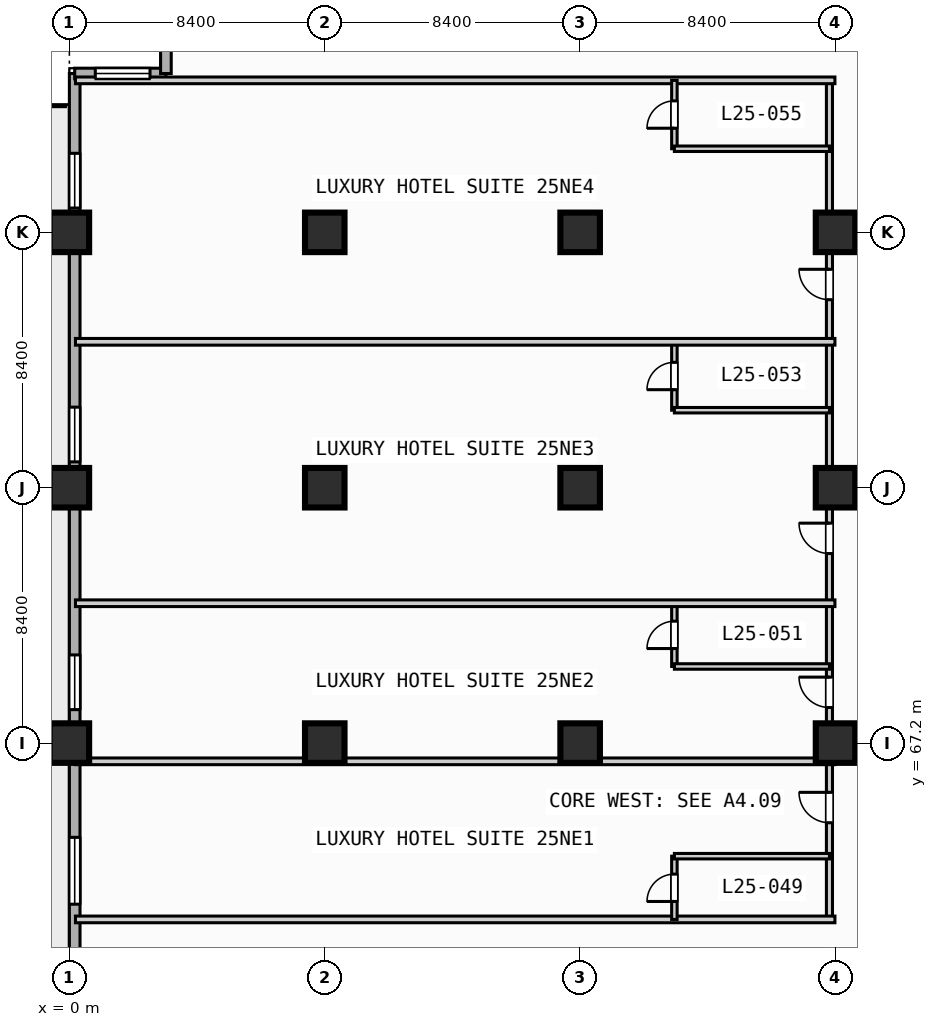
"""IFC4 building model, lengths in metres.
Left out: names, types, materials, properties, quantities, classifications, styles, units other than length and angle.
Written with IfcOpenShell. Run it as: python <this file> out.ifc"""

import sys

from ifc_helpers import new_model, si_unit, direction, frame, frame_2d, origin, origin_2d, place, context, subcontext, project, spatial, rectangle, extrude, element, fill, save


model = new_model("IFC4")
c1 = context("Model", 3, precision=1e-05, world=origin(), true_north=direction((0.0, 1.0)))
c2 = subcontext(c1, "Body", "Model", "MODEL_VIEW")
j1 = project(units=[si_unit("LENGTHUNIT", "METRE"), si_unit("PLANEANGLEUNIT", "RADIAN")], contexts=[c1])
p1 = place(None, origin())
s1 = spatial("IfcSite", under=j1, at=p1, CompositionType="ELEMENT")
p2 = place(p1, origin())
s2 = spatial("IfcBuilding", under=s1, at=p2, CompositionType="ELEMENT")
p3 = place(p2, frame((0.0, 0.0, 107.6)))
s3 = spatial("IfcBuildingStorey", under=s2, at=p3, CompositionType="ELEMENT", Elevation=107.6)
for number, where, z_axis, x_axis in (
    (1, (0.0, 67.2, 0.0), (0.0, 0.0, 1.0), (1.0, 0.0, 0.0)),
    (2, (0.0, 75.6, 0.0), (0.0, 0.0, 1.0), (1.0, 0.0, 0.0)),
    (3, (0.0, 84.0, 0.0), (0.0, 0.0, 1.0), (1.0, 0.0, 0.0)),
    (4, (8.4, 67.2, 0.0), (0.0, 0.0, 1.0), (1.0, 0.0, 0.0)),
    (5, (8.4, 75.6, 0.0), (0.0, 0.0, 1.0), (1.0, 0.0, 0.0)),
    (6, (8.4, 84.0, 0.0), (0.0, 0.0, 1.0), (1.0, 0.0, 0.0)),
    (7, (16.8, 67.2, 0.0), (0.0, 0.0, 1.0), (1.0, 0.0, 0.0)),
    (8, (16.8, 75.6, 0.0), (0.0, 0.0, 1.0), (1.0, 0.0, 0.0)),
    (9, (16.8, 84.0, 0.0), (0.0, 0.0, 1.0), (1.0, 0.0, 0.0)),
    (10, (25.2, 67.2, 0.0), (0.0, 0.0, 1.0), (1.0, 0.0, 0.0)),
    (11, (25.2, 75.6, 0.0), (0.0, 0.0, 1.0), (1.0, 0.0, 0.0)),
    (12, (25.2, 84.0, 0.0), (0.0, 0.0, 1.0), (1.0, 0.0, 0.0)),
):
    element("IfcColumn", number, at=place(p3, frame(where, z_axis=z_axis, x_axis=x_axis)), inside=s3, PredefinedType="COLUMN", context=c2, shape_type="SweptSolid", body=[
        extrude(rectangle(XDim=1.3, YDim=1.3, at=origin_2d()), origin(), (0.0, 0.0, 1.0), 3.8),
    ])
p4 = place(p3, frame((0.175, 3.175, 0.0), z_axis=(0.0, 0.0, 1.0), x_axis=(0.0, 1.0, 0.0)))
e13 = element("IfcWall", 13, at=p4, inside=s3, PredefinedType="STANDARD", context=c2, shape_type="SweptSolid", body=[
    extrude(rectangle(XDim=86.05, YDim=0.35, at=frame_2d((43.025, 0.0))), origin(), (0.0, 0.0, 1.0), 3.55),
])
p5 = place(p4, frame((42.325, 0.0, 0.0)))
e14 = element("IfcOpeningElement", 14, at=p5, cuts=e13, PredefinedType="OPENING", context=c2, shape_type="SweptSolid", body=[
    extrude(rectangle(XDim=1.4, YDim=2.2, at=frame_2d((0.7, 1.1))), frame((0.0, 0.185, 0.0), z_axis=(0.0, -1.0, 0.0), x_axis=(1.0, 0.0, 0.0)), (0.0, 0.0, 1.0), 0.37),
])
p6 = place(p4, frame((25.125, 0.0, 0.85)))
e15 = element("IfcOpeningElement", 15, at=p6, cuts=e13, PredefinedType="OPENING", context=c2, shape_type="SweptSolid", body=[
    extrude(rectangle(XDim=2.2, YDim=1.8, at=frame_2d((1.1, 0.9))), frame((0.0, 0.185, 0.0), z_axis=(0.0, -1.0, 0.0), x_axis=(1.0, 0.0, 0.0)), (0.0, 0.0, 1.0), 0.37),
])
p7 = place(p4, frame((33.525, 0.0, 0.85)))
e16 = element("IfcOpeningElement", 16, at=p7, cuts=e13, PredefinedType="OPENING", context=c2, shape_type="SweptSolid", body=[
    extrude(rectangle(XDim=2.2, YDim=1.8, at=frame_2d((1.1, 0.9))), frame((0.0, 0.185, 0.0), z_axis=(0.0, -1.0, 0.0), x_axis=(1.0, 0.0, 0.0)), (0.0, 0.0, 1.0), 0.37),
])
p8 = place(p4, frame((58.725, 0.0, 0.85)))
e17 = element("IfcOpeningElement", 17, at=p8, cuts=e13, PredefinedType="OPENING", context=c2, shape_type="SweptSolid", body=[
    extrude(rectangle(XDim=2.2, YDim=1.8, at=frame_2d((1.1, 0.9))), frame((0.0, 0.185, 0.0), z_axis=(0.0, -1.0, 0.0), x_axis=(1.0, 0.0, 0.0)), (0.0, 0.0, 1.0), 0.37),
])
p9 = place(p4, frame((65.125, 0.0, 0.85)))
e18 = element("IfcOpeningElement", 18, at=p9, cuts=e13, PredefinedType="OPENING", context=c2, shape_type="SweptSolid", body=[
    extrude(rectangle(XDim=1.8, YDim=1.8, at=frame_2d((0.9, 0.9))), frame((0.0, 0.185, 0.0), z_axis=(0.0, -1.0, 0.0), x_axis=(1.0, 0.0, 0.0)), (0.0, 0.0, 1.0), 0.37),
])
p10 = place(p4, frame((73.275, 0.0, 0.85)))
e19 = element("IfcOpeningElement", 19, at=p10, cuts=e13, PredefinedType="OPENING", context=c2, shape_type="SweptSolid", body=[
    extrude(rectangle(XDim=1.8, YDim=1.8, at=frame_2d((0.9, 0.9))), frame((0.0, 0.185, 0.0), z_axis=(0.0, -1.0, 0.0), x_axis=(1.0, 0.0, 0.0)), (0.0, 0.0, 1.0), 0.37),
])
p11 = place(p4, frame((81.625, 0.0, 0.85)))
e20 = element("IfcOpeningElement", 20, at=p11, cuts=e13, PredefinedType="OPENING", context=c2, shape_type="SweptSolid", body=[
    extrude(rectangle(XDim=1.8, YDim=1.8, at=frame_2d((0.9, 0.9))), frame((0.0, 0.185, 0.0), z_axis=(0.0, -1.0, 0.0), x_axis=(1.0, 0.0, 0.0)), (0.0, 0.0, 1.0), 0.37),
])
p12 = place(p3, frame((0.175, 89.225, 0.0), z_axis=(0.0, 0.0, 1.0), x_axis=(1.0, 0.0, 0.0)))
e21 = element("IfcWall", 21, at=p12, inside=s3, PredefinedType="STANDARD", context=c2, shape_type="SweptSolid", body=[
    extrude(rectangle(XDim=3.0, YDim=0.35, at=frame_2d((1.5, 0.0))), origin(), (0.0, 0.0, 1.0), 3.55),
])
p13 = place(p12, frame((0.677, 0.0, 0.85)))
e22 = element("IfcOpeningElement", 22, at=p13, cuts=e21, PredefinedType="OPENING", context=c2, shape_type="SweptSolid", body=[
    extrude(rectangle(XDim=1.8, YDim=1.8, at=frame_2d((0.9, 0.9))), frame((0.0, 0.185, 0.0), z_axis=(0.0, -1.0, 0.0), x_axis=(1.0, 0.0, 0.0)), (0.0, 0.0, 1.0), 0.37),
])
p14 = place(p3, frame((3.175, 89.225, 0.0), z_axis=(0.0, 0.0, 1.0), x_axis=(0.0, 1.0, 0.0)))
e23 = element("IfcWall", 23, at=p14, inside=s3, PredefinedType="STANDARD", context=c2, shape_type="SweptSolid", body=[
    extrude(rectangle(XDim=3.0, YDim=0.35, at=frame_2d((1.5, 0.0))), origin(), (0.0, 0.0, 1.0), 3.55),
])
p15 = place(p3, frame((25.0, 61.4, 0.0), z_axis=(0.0, 0.0, 1.0), x_axis=(0.0, 1.0, 0.0)))
e24 = element("IfcWall", 24, at=p15, inside=s3, PredefinedType="PARTITIONING", context=c2, shape_type="SweptSolid", body=[
    extrude(rectangle(XDim=27.6, YDim=0.2, at=frame_2d((13.8, 0.0))), origin(), (0.0, 0.0, 1.0), 2.8),
])
p16 = place(p15, frame((3.18, 0.0, 0.0)))
e25 = element("IfcOpeningElement", 25, at=p16, cuts=e24, PredefinedType="OPENING", context=c2, shape_type="SweptSolid", body=[
    extrude(rectangle(XDim=1.0, YDim=2.15, at=frame_2d((0.5, 1.075))), frame((0.0, 0.11, 0.0), z_axis=(0.0, -1.0, 0.0), x_axis=(1.0, 0.0, 0.0)), (0.0, 0.0, 1.0), 0.22),
])
p17 = place(p15, frame((6.97, 0.0, 0.0)))
e26 = element("IfcOpeningElement", 26, at=p17, cuts=e24, PredefinedType="OPENING", context=c2, shape_type="SweptSolid", body=[
    extrude(rectangle(XDim=1.0, YDim=2.15, at=frame_2d((0.5, 1.075))), frame((0.0, 0.11, 0.0), z_axis=(0.0, -1.0, 0.0), x_axis=(1.0, 0.0, 0.0)), (0.0, 0.0, 1.0), 0.22),
])
p18 = place(p15, frame((12.035, 0.0, 0.0)))
e27 = element("IfcOpeningElement", 27, at=p18, cuts=e24, PredefinedType="OPENING", context=c2, shape_type="SweptSolid", body=[
    extrude(rectangle(XDim=1.0, YDim=2.15, at=frame_2d((0.5, 1.075))), frame((0.0, 0.11, 0.0), z_axis=(0.0, -1.0, 0.0), x_axis=(1.0, 0.0, 0.0)), (0.0, 0.0, 1.0), 0.22),
])
p19 = place(p15, frame((20.385, 0.0, 0.0)))
e28 = element("IfcOpeningElement", 28, at=p19, cuts=e24, PredefinedType="OPENING", context=c2, shape_type="SweptSolid", body=[
    extrude(rectangle(XDim=1.0, YDim=2.15, at=frame_2d((0.5, 1.075))), frame((0.0, 0.11, 0.0), z_axis=(0.0, -1.0, 0.0), x_axis=(1.0, 0.0, 0.0)), (0.0, 0.0, 1.0), 0.22),
])
p20 = place(p3, frame((0.2, 61.4, 0.0), z_axis=(0.0, 0.0, 1.0), x_axis=(1.0, 0.0, 0.0)))
e29 = element("IfcWall", 29, at=p20, inside=s3, PredefinedType="PARTITIONING", context=c2, shape_type="SweptSolid", body=[
    extrude(rectangle(XDim=24.98, YDim=0.22, at=frame_2d((12.49, 0.0))), origin(), (0.0, 0.0, 1.0), 3.55),
])
p21 = place(p3, frame((19.9, 61.4, 0.0), z_axis=(0.0, 0.0, 1.0), x_axis=(0.0, 1.0, 0.0)))
e30 = element("IfcWall", 30, at=p21, inside=s3, PredefinedType="PLUMBINGWALL", context=c2, shape_type="SweptSolid", body=[
    extrude(rectangle(XDim=2.08, YDim=0.18, at=frame_2d((1.04, 0.0))), origin(), (0.0, 0.0, 1.0), 3.55),
])
p22 = place(p21, frame((0.59, 0.0, 0.0)))
e31 = element("IfcOpeningElement", 31, at=p22, cuts=e30, PredefinedType="OPENING", context=c2, shape_type="SweptSolid", body=[
    extrude(rectangle(XDim=0.9, YDim=2.1, at=frame_2d((0.45, 1.05))), frame((0.0, 0.1, 0.0), z_axis=(0.0, -1.0, 0.0), x_axis=(1.0, 0.0, 0.0)), (0.0, 0.0, 1.0), 0.2),
])
p23 = place(p3, frame((19.9, 63.48, 0.0), z_axis=(0.0, 0.0, 1.0), x_axis=(1.0, 0.0, 0.0)))
e32 = element("IfcWall", 32, at=p23, inside=s3, PredefinedType="PLUMBINGWALL", context=c2, shape_type="SweptSolid", body=[
    extrude(rectangle(XDim=5.1, YDim=0.18, at=frame_2d((2.55, 0.0))), origin(), (0.0, 0.0, 1.0), 3.55),
])
p24 = place(p3, frame((0.2, 66.6, 0.0), z_axis=(0.0, 0.0, 1.0), x_axis=(1.0, 0.0, 0.0)))
e33 = element("IfcWall", 33, at=p24, inside=s3, PredefinedType="PARTITIONING", context=c2, shape_type="SweptSolid", body=[
    extrude(rectangle(XDim=24.98, YDim=0.22, at=frame_2d((12.49, 0.0))), origin(), (0.0, 0.0, 1.0), 3.55),
])
p25 = place(p3, frame((19.9, 69.72, 0.0), z_axis=(0.0, 0.0, 1.0), x_axis=(0.0, 1.0, 0.0)))
e34 = element("IfcWall", 34, at=p25, inside=s3, PredefinedType="PLUMBINGWALL", context=c2, shape_type="SweptSolid", body=[
    extrude(rectangle(XDim=2.08, YDim=0.18, at=frame_2d((1.04, 0.0))), origin(), (0.0, 0.0, 1.0), 3.55),
])
p26 = place(p25, frame((0.59, 0.0, 0.0)))
e35 = element("IfcOpeningElement", 35, at=p26, cuts=e34, PredefinedType="OPENING", context=c2, shape_type="SweptSolid", body=[
    extrude(rectangle(XDim=0.9, YDim=2.1, at=frame_2d((0.45, 1.05))), frame((0.0, 0.1, 0.0), z_axis=(0.0, -1.0, 0.0), x_axis=(1.0, 0.0, 0.0)), (0.0, 0.0, 1.0), 0.2),
])
p27 = place(p3, frame((19.9, 69.72, 0.0), z_axis=(0.0, 0.0, 1.0), x_axis=(1.0, 0.0, 0.0)))
e36 = element("IfcWall", 36, at=p27, inside=s3, PredefinedType="PLUMBINGWALL", context=c2, shape_type="SweptSolid", body=[
    extrude(rectangle(XDim=5.1, YDim=0.18, at=frame_2d((2.55, 0.0))), origin(), (0.0, 0.0, 1.0), 3.55),
])
p28 = place(p3, frame((0.2, 71.8, 0.0), z_axis=(0.0, 0.0, 1.0), x_axis=(1.0, 0.0, 0.0)))
e37 = element("IfcWall", 37, at=p28, inside=s3, PredefinedType="PARTITIONING", context=c2, shape_type="SweptSolid", body=[
    extrude(rectangle(XDim=24.98, YDim=0.22, at=frame_2d((12.49, 0.0))), origin(), (0.0, 0.0, 1.0), 3.55),
])
p29 = place(p3, frame((19.9, 78.15, 0.0), z_axis=(0.0, 0.0, 1.0), x_axis=(0.0, 1.0, 0.0)))
e38 = element("IfcWall", 38, at=p29, inside=s3, PredefinedType="PLUMBINGWALL", context=c2, shape_type="SweptSolid", body=[
    extrude(rectangle(XDim=2.25, YDim=0.18, at=frame_2d((1.125, 0.0))), origin(), (0.0, 0.0, 1.0), 3.55),
])
p30 = place(p29, frame((0.675, 0.0, 0.0)))
e39 = element("IfcOpeningElement", 39, at=p30, cuts=e38, PredefinedType="OPENING", context=c2, shape_type="SweptSolid", body=[
    extrude(rectangle(XDim=0.9, YDim=2.1, at=frame_2d((0.45, 1.05))), frame((0.0, 0.1, 0.0), z_axis=(0.0, -1.0, 0.0), x_axis=(1.0, 0.0, 0.0)), (0.0, 0.0, 1.0), 0.2),
])
p31 = place(p3, frame((19.9, 78.15, 0.0), z_axis=(0.0, 0.0, 1.0), x_axis=(1.0, 0.0, 0.0)))
e40 = element("IfcWall", 40, at=p31, inside=s3, PredefinedType="PLUMBINGWALL", context=c2, shape_type="SweptSolid", body=[
    extrude(rectangle(XDim=5.1, YDim=0.18, at=frame_2d((2.55, 0.0))), origin(), (0.0, 0.0, 1.0), 3.55),
])
for number, where, z_axis, x_axis in (
    (41, (0.2, 80.4, 0.0), (0.0, 0.0, 1.0), (1.0, 0.0, 0.0)),
    (42, (0.2, 89.0, 0.0), (0.0, 0.0, 1.0), (1.0, 0.0, 0.0)),
):
    element("IfcWall", number, at=place(p3, frame(where, z_axis=z_axis, x_axis=x_axis)), inside=s3, PredefinedType="PARTITIONING", context=c2, shape_type="SweptSolid", body=[
        extrude(rectangle(XDim=24.98, YDim=0.22, at=frame_2d((12.49, 0.0))), origin(), (0.0, 0.0, 1.0), 3.55),
    ])
p32 = place(p3, frame((19.9, 86.75, 0.0), z_axis=(0.0, 0.0, 1.0), x_axis=(0.0, 1.0, 0.0)))
e43 = element("IfcWall", 43, at=p32, inside=s3, PredefinedType="PLUMBINGWALL", context=c2, shape_type="SweptSolid", body=[
    extrude(rectangle(XDim=2.25, YDim=0.18, at=frame_2d((1.125, 0.0))), origin(), (0.0, 0.0, 1.0), 3.55),
])
p33 = place(p32, frame((0.675, 0.0, 0.0)))
e44 = element("IfcOpeningElement", 44, at=p33, cuts=e43, PredefinedType="OPENING", context=c2, shape_type="SweptSolid", body=[
    extrude(rectangle(XDim=0.9, YDim=2.1, at=frame_2d((0.45, 1.05))), frame((0.0, 0.1, 0.0), z_axis=(0.0, -1.0, 0.0), x_axis=(1.0, 0.0, 0.0)), (0.0, 0.0, 1.0), 0.2),
])
p34 = place(p3, frame((19.9, 86.75, 0.0), z_axis=(0.0, 0.0, 1.0), x_axis=(1.0, 0.0, 0.0)))
e45 = element("IfcWall", 45, at=p34, inside=s3, PredefinedType="PLUMBINGWALL", context=c2, shape_type="SweptSolid", body=[
    extrude(rectangle(XDim=5.1, YDim=0.18, at=frame_2d((2.55, 0.0))), origin(), (0.0, 0.0, 1.0), 3.55),
])
p35 = place(p8, origin())
e46 = element("IfcWindow", 46, at=p35, inside=s3, PartitioningType="SINGLE_PANEL", PredefinedType="WINDOW", context=c2, shape_type="SweptSolid", body=[
    extrude(rectangle(XDim=2.2, YDim=1.8, at=frame_2d((1.1, 0.9))), frame((0.0, 0.03, 0.0), z_axis=(0.0, -1.0, 0.0), x_axis=(1.0, 0.0, 0.0)), (0.0, 0.0, 1.0), 0.06),
])
fill(e17, e46)
p36 = place(p9, origin())
e47 = element("IfcWindow", 47, at=p36, inside=s3, PartitioningType="SINGLE_PANEL", PredefinedType="WINDOW", context=c2, shape_type="SweptSolid", body=[
    extrude(rectangle(XDim=1.8, YDim=1.8, at=frame_2d((0.9, 0.9))), frame((0.0, 0.03, 0.0), z_axis=(0.0, -1.0, 0.0), x_axis=(1.0, 0.0, 0.0)), (0.0, 0.0, 1.0), 0.06),
])
fill(e18, e47)
p37 = place(p10, origin())
e48 = element("IfcWindow", 48, at=p37, inside=s3, PartitioningType="SINGLE_PANEL", PredefinedType="WINDOW", context=c2, shape_type="SweptSolid", body=[
    extrude(rectangle(XDim=1.8, YDim=1.8, at=frame_2d((0.9, 0.9))), frame((0.0, 0.03, 0.0), z_axis=(0.0, -1.0, 0.0), x_axis=(1.0, 0.0, 0.0)), (0.0, 0.0, 1.0), 0.06),
])
fill(e19, e48)
p38 = place(p11, origin())
e49 = element("IfcWindow", 49, at=p38, inside=s3, PartitioningType="SINGLE_PANEL", PredefinedType="WINDOW", context=c2, shape_type="SweptSolid", body=[
    extrude(rectangle(XDim=1.8, YDim=1.8, at=frame_2d((0.9, 0.9))), frame((0.0, 0.03, 0.0), z_axis=(0.0, -1.0, 0.0), x_axis=(1.0, 0.0, 0.0)), (0.0, 0.0, 1.0), 0.06),
])
fill(e20, e49)
p39 = place(p13, origin())
e50 = element("IfcWindow", 50, at=p39, inside=s3, PartitioningType="SINGLE_PANEL", PredefinedType="WINDOW", context=c2, shape_type="SweptSolid", body=[
    extrude(rectangle(XDim=1.8, YDim=1.8, at=frame_2d((0.9, 0.9))), frame((0.0, 0.03, 0.0), z_axis=(0.0, -1.0, 0.0), x_axis=(1.0, 0.0, 0.0)), (0.0, 0.0, 1.0), 0.06),
])
fill(e22, e50)
p40 = place(p16, origin())
e51 = element("IfcDoor", 51, at=p40, inside=s3, OperationType="SINGLE_SWING_RIGHT", PredefinedType="DOOR", context=c2, shape_type="SweptSolid", body=[
    extrude(rectangle(XDim=1.0, YDim=2.15, at=frame_2d((0.5, 1.075))), frame((0.0, 0.025, 0.0), z_axis=(0.0, -1.0, 0.0), x_axis=(1.0, 0.0, 0.0)), (0.0, 0.0, 1.0), 0.05),
])
fill(e25, e51)
p41 = place(p17, origin())
e52 = element("IfcDoor", 52, at=p41, inside=s3, OperationType="SINGLE_SWING_RIGHT", PredefinedType="DOOR", context=c2, shape_type="SweptSolid", body=[
    extrude(rectangle(XDim=1.0, YDim=2.15, at=frame_2d((0.5, 1.075))), frame((0.0, 0.025, 0.0), z_axis=(0.0, -1.0, 0.0), x_axis=(1.0, 0.0, 0.0)), (0.0, 0.0, 1.0), 0.05),
])
fill(e26, e52)
p42 = place(p18, origin())
e53 = element("IfcDoor", 53, at=p42, inside=s3, OperationType="SINGLE_SWING_RIGHT", PredefinedType="DOOR", context=c2, shape_type="SweptSolid", body=[
    extrude(rectangle(XDim=1.0, YDim=2.15, at=frame_2d((0.5, 1.075))), frame((0.0, 0.025, 0.0), z_axis=(0.0, -1.0, 0.0), x_axis=(1.0, 0.0, 0.0)), (0.0, 0.0, 1.0), 0.05),
])
fill(e27, e53)
p43 = place(p19, origin())
e54 = element("IfcDoor", 54, at=p43, inside=s3, OperationType="SINGLE_SWING_RIGHT", PredefinedType="DOOR", context=c2, shape_type="SweptSolid", body=[
    extrude(rectangle(XDim=1.0, YDim=2.15, at=frame_2d((0.5, 1.075))), frame((0.0, 0.025, 0.0), z_axis=(0.0, -1.0, 0.0), x_axis=(1.0, 0.0, 0.0)), (0.0, 0.0, 1.0), 0.05),
])
fill(e28, e54)
p44 = place(p22, origin())
e55 = element("IfcDoor", 55, at=p44, inside=s3, OperationType="SINGLE_SWING_LEFT", PredefinedType="DOOR", context=c2, shape_type="SweptSolid", body=[
    extrude(rectangle(XDim=0.9, YDim=2.1, at=frame_2d((0.45, 1.05))), frame((0.0, 0.025, 0.0), z_axis=(0.0, -1.0, 0.0), x_axis=(1.0, 0.0, 0.0)), (0.0, 0.0, 1.0), 0.05),
])
fill(e31, e55)
p45 = place(p26, origin())
e56 = element("IfcDoor", 56, at=p45, inside=s3, OperationType="SINGLE_SWING_LEFT", PredefinedType="DOOR", context=c2, shape_type="SweptSolid", body=[
    extrude(rectangle(XDim=0.9, YDim=2.1, at=frame_2d((0.45, 1.05))), frame((0.0, 0.025, 0.0), z_axis=(0.0, -1.0, 0.0), x_axis=(1.0, 0.0, 0.0)), (0.0, 0.0, 1.0), 0.05),
])
fill(e35, e56)
p46 = place(p30, origin())
e57 = element("IfcDoor", 57, at=p46, inside=s3, OperationType="SINGLE_SWING_LEFT", PredefinedType="DOOR", context=c2, shape_type="SweptSolid", body=[
    extrude(rectangle(XDim=0.9, YDim=2.1, at=frame_2d((0.45, 1.05))), frame((0.0, 0.025, 0.0), z_axis=(0.0, -1.0, 0.0), x_axis=(1.0, 0.0, 0.0)), (0.0, 0.0, 1.0), 0.05),
])
fill(e39, e57)
p47 = place(p33, origin())
e58 = element("IfcDoor", 58, at=p47, inside=s3, OperationType="SINGLE_SWING_LEFT", PredefinedType="DOOR", context=c2, shape_type="SweptSolid", body=[
    extrude(rectangle(XDim=0.9, YDim=2.1, at=frame_2d((0.45, 1.05))), frame((0.0, 0.025, 0.0), z_axis=(0.0, -1.0, 0.0), x_axis=(1.0, 0.0, 0.0)), (0.0, 0.0, 1.0), 0.05),
])
fill(e44, e58)
save(model, sys.argv[1])
